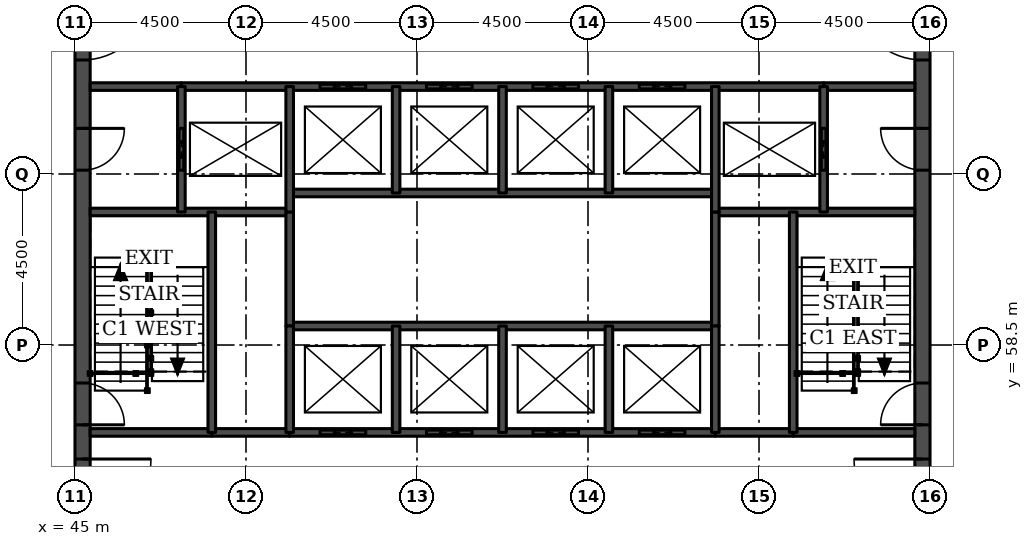
"""IFC4 building model, lengths in metres.
Left out: names, types, materials, properties, quantities, classifications, styles, units other than length and angle.
Written with IfcOpenShell. Run it as: python <this file> out.ifc"""

import sys

from ifc_helpers import new_model, si_unit, direction, frame, frame_2d, origin, place, context, subcontext, project, spatial, rectangle, extrude, element, fill, save


model = new_model("IFC4")
c1 = context("Model", 3, precision=1e-05, world=origin(), true_north=direction((0.0, 1.0)))
c2 = subcontext(c1, "Body", "Model", "MODEL_VIEW")
j1 = project(units=[si_unit("LENGTHUNIT", "METRE"), si_unit("PLANEANGLEUNIT", "RADIAN")], contexts=[c1])
p1 = place(None, origin())
s1 = spatial("IfcSite", under=j1, at=p1, CompositionType="ELEMENT")
p2 = place(p1, origin())
s2 = spatial("IfcBuilding", under=s1, at=p2, CompositionType="ELEMENT")
p3 = place(p2, frame((0.0, 0.0, 155.1)))
s3 = spatial("IfcBuildingStorey", under=s2, at=p3, CompositionType="ELEMENT", Elevation=155.1)
p4 = place(p3, frame((45.2, 49.5, 0.0), z_axis=(0.0, 0.0, 1.0), x_axis=(0.0, 1.0, 0.0)))
e1 = element("IfcWall", 1, at=p4, inside=s3, PredefinedType="SHEAR", context=c2, shape_type="SweptSolid", body=[
    extrude(rectangle(XDim=22.5, YDim=0.4, at=frame_2d((11.25, 0.0))), origin(), (0.0, 0.0, 1.0), 3.7),
])
p5 = place(p4, frame((4.2, 0.0, 0.0)))
e2 = element("IfcOpeningElement", 2, at=p5, cuts=e1, PredefinedType="OPENING", context=c2, shape_type="SweptSolid", body=[
    extrude(rectangle(XDim=1.8, YDim=2.1, at=frame_2d((0.9, 1.05))), frame((0.0, 0.21, 0.0), z_axis=(0.0, -1.0, 0.0), x_axis=(1.0, 0.0, 0.0)), (0.0, 0.0, 1.0), 0.42),
])
p6 = place(p4, frame((6.9, 0.0, 0.0)))
e3 = element("IfcOpeningElement", 3, at=p6, cuts=e1, PredefinedType="OPENING", context=c2, shape_type="SweptSolid", body=[
    extrude(rectangle(XDim=1.1, YDim=2.1, at=frame_2d((0.55, 1.05))), frame((0.0, 0.21, 0.0), z_axis=(0.0, -1.0, 0.0), x_axis=(1.0, 0.0, 0.0)), (0.0, 0.0, 1.0), 0.42),
])
p7 = place(p4, frame((13.6, 0.0, 0.0)))
e4 = element("IfcOpeningElement", 4, at=p7, cuts=e1, PredefinedType="OPENING", context=c2, shape_type="SweptSolid", body=[
    extrude(rectangle(XDim=1.1, YDim=2.1, at=frame_2d((0.55, 1.05))), frame((0.0, 0.21, 0.0), z_axis=(0.0, -1.0, 0.0), x_axis=(1.0, 0.0, 0.0)), (0.0, 0.0, 1.0), 0.42),
])
p8 = place(p4, frame((16.5, 0.0, 0.0)))
e5 = element("IfcOpeningElement", 5, at=p8, cuts=e1, PredefinedType="OPENING", context=c2, shape_type="SweptSolid", body=[
    extrude(rectangle(XDim=1.8, YDim=2.1, at=frame_2d((0.9, 1.05))), frame((0.0, 0.21, 0.0), z_axis=(0.0, -1.0, 0.0), x_axis=(1.0, 0.0, 0.0)), (0.0, 0.0, 1.0), 0.42),
])
p9 = place(p3, frame((67.3, 49.5, 0.0), z_axis=(0.0, 0.0, 1.0), x_axis=(0.0, 1.0, 0.0)))
e6 = element("IfcWall", 6, at=p9, inside=s3, PredefinedType="SHEAR", context=c2, shape_type="SweptSolid", body=[
    extrude(rectangle(XDim=22.5, YDim=0.4, at=frame_2d((11.25, 0.0))), origin(), (0.0, 0.0, 1.0), 3.7),
])
p10 = place(p9, frame((4.2, 0.0, 0.0)))
e7 = element("IfcOpeningElement", 7, at=p10, cuts=e6, PredefinedType="OPENING", context=c2, shape_type="SweptSolid", body=[
    extrude(rectangle(XDim=1.8, YDim=2.1, at=frame_2d((0.9, 1.05))), frame((0.0, 0.21, 0.0), z_axis=(0.0, -1.0, 0.0), x_axis=(1.0, 0.0, 0.0)), (0.0, 0.0, 1.0), 0.42),
])
p11 = place(p9, frame((6.9, 0.0, 0.0)))
e8 = element("IfcOpeningElement", 8, at=p11, cuts=e6, PredefinedType="OPENING", context=c2, shape_type="SweptSolid", body=[
    extrude(rectangle(XDim=1.1, YDim=2.1, at=frame_2d((0.55, 1.05))), frame((0.0, 0.21, 0.0), z_axis=(0.0, -1.0, 0.0), x_axis=(1.0, 0.0, 0.0)), (0.0, 0.0, 1.0), 0.42),
])
p12 = place(p9, frame((13.6, 0.0, 0.0)))
e9 = element("IfcOpeningElement", 9, at=p12, cuts=e6, PredefinedType="OPENING", context=c2, shape_type="SweptSolid", body=[
    extrude(rectangle(XDim=1.1, YDim=2.1, at=frame_2d((0.55, 1.05))), frame((0.0, 0.21, 0.0), z_axis=(0.0, -1.0, 0.0), x_axis=(1.0, 0.0, 0.0)), (0.0, 0.0, 1.0), 0.42),
])
p13 = place(p9, frame((16.5, 0.0, 0.0)))
e10 = element("IfcOpeningElement", 10, at=p13, cuts=e6, PredefinedType="OPENING", context=c2, shape_type="SweptSolid", body=[
    extrude(rectangle(XDim=1.8, YDim=2.1, at=frame_2d((0.9, 1.05))), frame((0.0, 0.21, 0.0), z_axis=(0.0, -1.0, 0.0), x_axis=(1.0, 0.0, 0.0)), (0.0, 0.0, 1.0), 0.42),
])
for number, where, z_axis, x_axis in (
    (11, (48.6, 56.2, 0.0), (0.0, 0.0, 1.0), (1.0, 0.0, 0.0)),
    (12, (61.85, 56.2, 0.0), (0.0, 0.0, 1.0), (1.0, 0.0, 0.0)),
):
    element("IfcWall", number, at=place(p3, frame(where, z_axis=z_axis, x_axis=x_axis)), inside=s3, PredefinedType="SOLIDWALL", context=c2, shape_type="SweptSolid", body=[
        extrude(rectangle(XDim=2.05, YDim=0.2, at=frame_2d((1.025, 0.0))), origin(), (0.0, 0.0, 1.0), 3.55),
    ])
p14 = place(p3, frame((45.4, 56.2, 0.0), z_axis=(0.0, 0.0, 1.0), x_axis=(1.0, 0.0, 0.0)))
e13 = element("IfcWall", 13, at=p14, inside=s3, PredefinedType="SOLIDWALL", context=c2, shape_type="SweptSolid", body=[
    extrude(rectangle(XDim=3.2, YDim=0.2, at=frame_2d((1.6, 0.0))), origin(), (0.0, 0.0, 1.0), 3.55),
])
p15 = place(p3, frame((50.65, 56.2, 0.0), z_axis=(0.0, 0.0, 1.0), x_axis=(1.0, 0.0, 0.0)))
e14 = element("IfcWall", 14, at=p15, inside=s3, PredefinedType="SOLIDWALL", context=c2, shape_type="SweptSolid", body=[
    extrude(rectangle(XDim=11.2, YDim=0.2, at=frame_2d((5.6, 0.0))), origin(), (0.0, 0.0, 1.0), 3.55),
])
p16 = place(p15, frame((0.8, 0.0, 0.0)))
e15 = element("IfcOpeningElement", 15, at=p16, cuts=e14, PredefinedType="OPENING", context=c2, shape_type="SweptSolid", body=[
    extrude(rectangle(XDim=1.2, YDim=2.1, at=frame_2d((0.6, 1.05))), frame((0.0, 0.11, 0.0), z_axis=(0.0, -1.0, 0.0), x_axis=(1.0, 0.0, 0.0)), (0.0, 0.0, 1.0), 0.22),
])
p17 = place(p15, frame((3.6, 0.0, 0.0)))
e16 = element("IfcOpeningElement", 16, at=p17, cuts=e14, PredefinedType="OPENING", context=c2, shape_type="SweptSolid", body=[
    extrude(rectangle(XDim=1.2, YDim=2.1, at=frame_2d((0.6, 1.05))), frame((0.0, 0.11, 0.0), z_axis=(0.0, -1.0, 0.0), x_axis=(1.0, 0.0, 0.0)), (0.0, 0.0, 1.0), 0.22),
])
p18 = place(p15, frame((6.4, 0.0, 0.0)))
e17 = element("IfcOpeningElement", 17, at=p18, cuts=e14, PredefinedType="OPENING", context=c2, shape_type="SweptSolid", body=[
    extrude(rectangle(XDim=1.2, YDim=2.1, at=frame_2d((0.6, 1.05))), frame((0.0, 0.11, 0.0), z_axis=(0.0, -1.0, 0.0), x_axis=(1.0, 0.0, 0.0)), (0.0, 0.0, 1.0), 0.22),
])
p19 = place(p15, frame((9.2, 0.0, 0.0)))
e18 = element("IfcOpeningElement", 18, at=p19, cuts=e14, PredefinedType="OPENING", context=c2, shape_type="SweptSolid", body=[
    extrude(rectangle(XDim=1.2, YDim=2.1, at=frame_2d((0.6, 1.05))), frame((0.0, 0.11, 0.0), z_axis=(0.0, -1.0, 0.0), x_axis=(1.0, 0.0, 0.0)), (0.0, 0.0, 1.0), 0.22),
])
p20 = place(p3, frame((63.9, 56.2, 0.0), z_axis=(0.0, 0.0, 1.0), x_axis=(1.0, 0.0, 0.0)))
e19 = element("IfcWall", 19, at=p20, inside=s3, PredefinedType="SOLIDWALL", context=c2, shape_type="SweptSolid", body=[
    extrude(rectangle(XDim=3.2, YDim=0.2, at=frame_2d((1.6, 0.0))), origin(), (0.0, 0.0, 1.0), 3.55),
])
p21 = place(p3, frame((50.65, 59.0, 0.0), z_axis=(0.0, 0.0, 1.0), x_axis=(1.0, 0.0, 0.0)))
e20 = element("IfcWall", 20, at=p21, inside=s3, PredefinedType="SOLIDWALL", context=c2, shape_type="SweptSolid", body=[
    extrude(rectangle(XDim=11.2, YDim=0.2, at=frame_2d((5.6, 0.0))), origin(), (0.0, 0.0, 1.0), 3.7),
])
for number, where, z_axis, x_axis in (
    (21, (45.4, 62.0, 0.0), (0.0, 0.0, 1.0), (1.0, 0.0, 0.0)),
    (22, (61.85, 62.0, 0.0), (0.0, 0.0, 1.0), (1.0, 0.0, 0.0)),
):
    element("IfcWall", number, at=place(p3, frame(where, z_axis=z_axis, x_axis=x_axis)), inside=s3, PredefinedType="SOLIDWALL", context=c2, shape_type="SweptSolid", body=[
        extrude(rectangle(XDim=5.25, YDim=0.2, at=frame_2d((2.625, 0.0))), origin(), (0.0, 0.0, 1.0), 3.55),
    ])
p22 = place(p3, frame((50.65, 62.5, 0.0), z_axis=(0.0, 0.0, 1.0), x_axis=(1.0, 0.0, 0.0)))
e23 = element("IfcWall", 23, at=p22, inside=s3, PredefinedType="SOLIDWALL", context=c2, shape_type="SweptSolid", body=[
    extrude(rectangle(XDim=11.2, YDim=0.2, at=frame_2d((5.6, 0.0))), origin(), (0.0, 0.0, 1.0), 3.7),
])
for number, where, z_axis, x_axis in (
    (24, (45.4, 65.3, 0.0), (0.0, 0.0, 1.0), (1.0, 0.0, 0.0)),
    (25, (64.7, 65.3, 0.0), (0.0, 0.0, 1.0), (1.0, 0.0, 0.0)),
):
    element("IfcWall", number, at=place(p3, frame(where, z_axis=z_axis, x_axis=x_axis)), inside=s3, PredefinedType="SOLIDWALL", context=c2, shape_type="SweptSolid", body=[
        extrude(rectangle(XDim=2.4, YDim=0.2, at=frame_2d((1.2, 0.0))), origin(), (0.0, 0.0, 1.0), 3.55),
    ])
p23 = place(p3, frame((47.8, 65.3, 0.0), z_axis=(0.0, 0.0, 1.0), x_axis=(1.0, 0.0, 0.0)))
e26 = element("IfcWall", 26, at=p23, inside=s3, PredefinedType="SOLIDWALL", context=c2, shape_type="SweptSolid", body=[
    extrude(rectangle(XDim=16.9, YDim=0.2, at=frame_2d((8.45, 0.0))), origin(), (0.0, 0.0, 1.0), 3.55),
])
p24 = place(p23, frame((3.65, 0.0, 0.0)))
e27 = element("IfcOpeningElement", 27, at=p24, cuts=e26, PredefinedType="OPENING", context=c2, shape_type="SweptSolid", body=[
    extrude(rectangle(XDim=1.2, YDim=2.1, at=frame_2d((0.6, 1.05))), frame((0.0, 0.11, 0.0), z_axis=(0.0, -1.0, 0.0), x_axis=(1.0, 0.0, 0.0)), (0.0, 0.0, 1.0), 0.22),
])
p25 = place(p23, frame((6.45, 0.0, 0.0)))
e28 = element("IfcOpeningElement", 28, at=p25, cuts=e26, PredefinedType="OPENING", context=c2, shape_type="SweptSolid", body=[
    extrude(rectangle(XDim=1.2, YDim=2.1, at=frame_2d((0.6, 1.05))), frame((0.0, 0.11, 0.0), z_axis=(0.0, -1.0, 0.0), x_axis=(1.0, 0.0, 0.0)), (0.0, 0.0, 1.0), 0.22),
])
p26 = place(p23, frame((9.25, 0.0, 0.0)))
e29 = element("IfcOpeningElement", 29, at=p26, cuts=e26, PredefinedType="OPENING", context=c2, shape_type="SweptSolid", body=[
    extrude(rectangle(XDim=1.2, YDim=2.1, at=frame_2d((0.6, 1.05))), frame((0.0, 0.11, 0.0), z_axis=(0.0, -1.0, 0.0), x_axis=(1.0, 0.0, 0.0)), (0.0, 0.0, 1.0), 0.22),
])
p27 = place(p23, frame((12.05, 0.0, 0.0)))
e30 = element("IfcOpeningElement", 30, at=p27, cuts=e26, PredefinedType="OPENING", context=c2, shape_type="SweptSolid", body=[
    extrude(rectangle(XDim=1.2, YDim=2.1, at=frame_2d((0.6, 1.05))), frame((0.0, 0.11, 0.0), z_axis=(0.0, -1.0, 0.0), x_axis=(1.0, 0.0, 0.0)), (0.0, 0.0, 1.0), 0.22),
])
p28 = place(p3, frame((47.8, 62.0, 0.0), z_axis=(0.0, 0.0, 1.0), x_axis=(0.0, 1.0, 0.0)))
e31 = element("IfcWall", 31, at=p28, inside=s3, PredefinedType="SOLIDWALL", context=c2, shape_type="SweptSolid", body=[
    extrude(rectangle(XDim=3.3, YDim=0.2, at=frame_2d((1.65, 0.0))), origin(), (0.0, 0.0, 1.0), 3.55),
])
p29 = place(p28, frame((1.1, 0.0, 0.0)))
e32 = element("IfcOpeningElement", 32, at=p29, cuts=e31, PredefinedType="OPENING", context=c2, shape_type="SweptSolid", body=[
    extrude(rectangle(XDim=1.1, YDim=2.1, at=frame_2d((0.55, 1.05))), frame((0.0, 0.11, 0.0), z_axis=(0.0, -1.0, 0.0), x_axis=(1.0, 0.0, 0.0)), (0.0, 0.0, 1.0), 0.22),
])
p30 = place(p3, frame((48.6, 56.2, 0.0), z_axis=(0.0, 0.0, 1.0), x_axis=(0.0, 1.0, 0.0)))
e33 = element("IfcWall", 33, at=p30, inside=s3, PredefinedType="SOLIDWALL", context=c2, shape_type="SweptSolid", body=[
    extrude(rectangle(XDim=5.8, YDim=0.2, at=frame_2d((2.9, 0.0))), origin(), (0.0, 0.0, 1.0), 3.55),
])
p31 = place(p3, frame((50.65, 59.0, 0.0), z_axis=(0.0, 0.0, 1.0), x_axis=(0.0, 1.0, 0.0)))
e34 = element("IfcWall", 34, at=p31, inside=s3, PredefinedType="SOLIDWALL", context=c2, shape_type="SweptSolid", body=[
    extrude(rectangle(XDim=3.0, YDim=0.2, at=frame_2d((1.5, 0.0))), origin(), (0.0, 0.0, 1.0), 3.7),
])
p32 = place(p3, frame((50.65, 56.2, 0.0), z_axis=(0.0, 0.0, 1.0), x_axis=(0.0, 1.0, 0.0)))
e35 = element("IfcWall", 35, at=p32, inside=s3, PredefinedType="SOLIDWALL", context=c2, shape_type="SweptSolid", body=[
    extrude(rectangle(XDim=2.8, YDim=0.2, at=frame_2d((1.4, 0.0))), origin(), (0.0, 0.0, 1.0), 3.55),
])
p33 = place(p3, frame((50.65, 62.0, 0.0), z_axis=(0.0, 0.0, 1.0), x_axis=(0.0, 1.0, 0.0)))
e36 = element("IfcWall", 36, at=p33, inside=s3, PredefinedType="SOLIDWALL", context=c2, shape_type="SweptSolid", body=[
    extrude(rectangle(XDim=3.3, YDim=0.2, at=frame_2d((1.65, 0.0))), origin(), (0.0, 0.0, 1.0), 3.55),
])
for number, where, z_axis, x_axis in (
    (37, (53.45, 56.2, 0.0), (0.0, 0.0, 1.0), (0.0, 1.0, 0.0)),
    (38, (53.45, 62.5, 0.0), (0.0, 0.0, 1.0), (0.0, 1.0, 0.0)),
    (39, (56.25, 56.2, 0.0), (0.0, 0.0, 1.0), (0.0, 1.0, 0.0)),
    (40, (56.25, 62.5, 0.0), (0.0, 0.0, 1.0), (0.0, 1.0, 0.0)),
    (41, (59.05, 56.2, 0.0), (0.0, 0.0, 1.0), (0.0, 1.0, 0.0)),
    (42, (59.05, 62.5, 0.0), (0.0, 0.0, 1.0), (0.0, 1.0, 0.0)),
):
    element("IfcWall", number, at=place(p3, frame(where, z_axis=z_axis, x_axis=x_axis)), inside=s3, PredefinedType="SOLIDWALL", context=c2, shape_type="SweptSolid", body=[
        extrude(rectangle(XDim=2.8, YDim=0.2, at=frame_2d((1.4, 0.0))), origin(), (0.0, 0.0, 1.0), 3.55),
    ])
p34 = place(p3, frame((61.85, 59.0, 0.0), z_axis=(0.0, 0.0, 1.0), x_axis=(0.0, 1.0, 0.0)))
e43 = element("IfcWall", 43, at=p34, inside=s3, PredefinedType="SOLIDWALL", context=c2, shape_type="SweptSolid", body=[
    extrude(rectangle(XDim=3.0, YDim=0.2, at=frame_2d((1.5, 0.0))), origin(), (0.0, 0.0, 1.0), 3.7),
])
p35 = place(p3, frame((61.85, 56.2, 0.0), z_axis=(0.0, 0.0, 1.0), x_axis=(0.0, 1.0, 0.0)))
e44 = element("IfcWall", 44, at=p35, inside=s3, PredefinedType="SOLIDWALL", context=c2, shape_type="SweptSolid", body=[
    extrude(rectangle(XDim=2.8, YDim=0.2, at=frame_2d((1.4, 0.0))), origin(), (0.0, 0.0, 1.0), 3.55),
])
p36 = place(p3, frame((61.85, 62.0, 0.0), z_axis=(0.0, 0.0, 1.0), x_axis=(0.0, 1.0, 0.0)))
e45 = element("IfcWall", 45, at=p36, inside=s3, PredefinedType="SOLIDWALL", context=c2, shape_type="SweptSolid", body=[
    extrude(rectangle(XDim=3.3, YDim=0.2, at=frame_2d((1.65, 0.0))), origin(), (0.0, 0.0, 1.0), 3.55),
])
p37 = place(p3, frame((63.9, 56.2, 0.0), z_axis=(0.0, 0.0, 1.0), x_axis=(0.0, 1.0, 0.0)))
e46 = element("IfcWall", 46, at=p37, inside=s3, PredefinedType="SOLIDWALL", context=c2, shape_type="SweptSolid", body=[
    extrude(rectangle(XDim=5.8, YDim=0.2, at=frame_2d((2.9, 0.0))), origin(), (0.0, 0.0, 1.0), 3.55),
])
p38 = place(p3, frame((64.7, 62.0, 0.0), z_axis=(0.0, 0.0, 1.0), x_axis=(0.0, 1.0, 0.0)))
e47 = element("IfcWall", 47, at=p38, inside=s3, PredefinedType="SOLIDWALL", context=c2, shape_type="SweptSolid", body=[
    extrude(rectangle(XDim=3.3, YDim=0.2, at=frame_2d((1.65, 0.0))), origin(), (0.0, 0.0, 1.0), 3.55),
])
p39 = place(p38, frame((1.1, 0.0, 0.0)))
e48 = element("IfcOpeningElement", 48, at=p39, cuts=e47, PredefinedType="OPENING", context=c2, shape_type="SweptSolid", body=[
    extrude(rectangle(XDim=1.1, YDim=2.1, at=frame_2d((0.55, 1.05))), frame((0.0, 0.11, 0.0), z_axis=(0.0, -1.0, 0.0), x_axis=(1.0, 0.0, 0.0)), (0.0, 0.0, 1.0), 0.22),
])
p40 = place(p16, origin())
e49 = element("IfcDoor", 49, at=p40, inside=s3, OperationType="DOUBLE_DOOR_SLIDING", PredefinedType="DOOR", context=c2, shape_type="SweptSolid", body=[
    extrude(rectangle(XDim=1.2, YDim=2.1, at=frame_2d((0.6, 1.05))), frame((0.0, 0.025, 0.0), z_axis=(0.0, -1.0, 0.0), x_axis=(1.0, 0.0, 0.0)), (0.0, 0.0, 1.0), 0.05),
])
fill(e15, e49)
p41 = place(p17, origin())
e50 = element("IfcDoor", 50, at=p41, inside=s3, OperationType="DOUBLE_DOOR_SLIDING", PredefinedType="DOOR", context=c2, shape_type="SweptSolid", body=[
    extrude(rectangle(XDim=1.2, YDim=2.1, at=frame_2d((0.6, 1.05))), frame((0.0, 0.025, 0.0), z_axis=(0.0, -1.0, 0.0), x_axis=(1.0, 0.0, 0.0)), (0.0, 0.0, 1.0), 0.05),
])
fill(e16, e50)
p42 = place(p18, origin())
e51 = element("IfcDoor", 51, at=p42, inside=s3, OperationType="DOUBLE_DOOR_SLIDING", PredefinedType="DOOR", context=c2, shape_type="SweptSolid", body=[
    extrude(rectangle(XDim=1.2, YDim=2.1, at=frame_2d((0.6, 1.05))), frame((0.0, 0.025, 0.0), z_axis=(0.0, -1.0, 0.0), x_axis=(1.0, 0.0, 0.0)), (0.0, 0.0, 1.0), 0.05),
])
fill(e17, e51)
p43 = place(p19, origin())
e52 = element("IfcDoor", 52, at=p43, inside=s3, OperationType="DOUBLE_DOOR_SLIDING", PredefinedType="DOOR", context=c2, shape_type="SweptSolid", body=[
    extrude(rectangle(XDim=1.2, YDim=2.1, at=frame_2d((0.6, 1.05))), frame((0.0, 0.025, 0.0), z_axis=(0.0, -1.0, 0.0), x_axis=(1.0, 0.0, 0.0)), (0.0, 0.0, 1.0), 0.05),
])
fill(e18, e52)
p44 = place(p24, origin())
e53 = element("IfcDoor", 53, at=p44, inside=s3, OperationType="DOUBLE_DOOR_SLIDING", PredefinedType="DOOR", context=c2, shape_type="SweptSolid", body=[
    extrude(rectangle(XDim=1.2, YDim=2.1, at=frame_2d((0.6, 1.05))), frame((0.0, 0.025, 0.0), z_axis=(0.0, -1.0, 0.0), x_axis=(1.0, 0.0, 0.0)), (0.0, 0.0, 1.0), 0.05),
])
fill(e27, e53)
p45 = place(p25, origin())
e54 = element("IfcDoor", 54, at=p45, inside=s3, OperationType="DOUBLE_DOOR_SLIDING", PredefinedType="DOOR", context=c2, shape_type="SweptSolid", body=[
    extrude(rectangle(XDim=1.2, YDim=2.1, at=frame_2d((0.6, 1.05))), frame((0.0, 0.025, 0.0), z_axis=(0.0, -1.0, 0.0), x_axis=(1.0, 0.0, 0.0)), (0.0, 0.0, 1.0), 0.05),
])
fill(e28, e54)
p46 = place(p26, origin())
e55 = element("IfcDoor", 55, at=p46, inside=s3, OperationType="DOUBLE_DOOR_SLIDING", PredefinedType="DOOR", context=c2, shape_type="SweptSolid", body=[
    extrude(rectangle(XDim=1.2, YDim=2.1, at=frame_2d((0.6, 1.05))), frame((0.0, 0.025, 0.0), z_axis=(0.0, -1.0, 0.0), x_axis=(1.0, 0.0, 0.0)), (0.0, 0.0, 1.0), 0.05),
])
fill(e29, e55)
p47 = place(p27, origin())
e56 = element("IfcDoor", 56, at=p47, inside=s3, OperationType="DOUBLE_DOOR_SLIDING", PredefinedType="DOOR", context=c2, shape_type="SweptSolid", body=[
    extrude(rectangle(XDim=1.2, YDim=2.1, at=frame_2d((0.6, 1.05))), frame((0.0, 0.025, 0.0), z_axis=(0.0, -1.0, 0.0), x_axis=(1.0, 0.0, 0.0)), (0.0, 0.0, 1.0), 0.05),
])
fill(e30, e56)
p48 = place(p29, origin())
e57 = element("IfcDoor", 57, at=p48, inside=s3, OperationType="DOUBLE_DOOR_SLIDING", PredefinedType="DOOR", context=c2, shape_type="SweptSolid", body=[
    extrude(rectangle(XDim=1.1, YDim=2.1, at=frame_2d((0.55, 1.05))), frame((0.0, 0.025, 0.0), z_axis=(0.0, -1.0, 0.0), x_axis=(1.0, 0.0, 0.0)), (0.0, 0.0, 1.0), 0.05),
])
fill(e32, e57)
p49 = place(p39, origin())
e58 = element("IfcDoor", 58, at=p49, inside=s3, OperationType="DOUBLE_DOOR_SLIDING", PredefinedType="DOOR", context=c2, shape_type="SweptSolid", body=[
    extrude(rectangle(XDim=1.1, YDim=2.1, at=frame_2d((0.55, 1.05))), frame((0.0, 0.025, 0.0), z_axis=(0.0, -1.0, 0.0), x_axis=(1.0, 0.0, 0.0)), (0.0, 0.0, 1.0), 0.05),
])
fill(e48, e58)
p50 = place(p5, frame((1.8, 0.0, 0.0), z_axis=(0.0, 0.0, 1.0), x_axis=(-1.0, 0.0, 0.0)))
e59 = element("IfcDoor", 59, at=p50, inside=s3, OperationType="SINGLE_SWING_LEFT", PredefinedType="DOOR", context=c2, shape_type="SweptSolid", body=[
    extrude(rectangle(XDim=1.8, YDim=2.1, at=frame_2d((0.9, 1.05))), frame((0.0, 0.025, 0.0), z_axis=(0.0, -1.0, 0.0), x_axis=(1.0, 0.0, 0.0)), (0.0, 0.0, 1.0), 0.05),
])
fill(e2, e59)
p51 = place(p6, frame((1.1, 0.0, 0.0), z_axis=(0.0, 0.0, 1.0), x_axis=(-1.0, 0.0, 0.0)))
e60 = element("IfcDoor", 60, at=p51, inside=s3, OperationType="SINGLE_SWING_RIGHT", PredefinedType="DOOR", context=c2, shape_type="SweptSolid", body=[
    extrude(rectangle(XDim=1.1, YDim=2.1, at=frame_2d((0.55, 1.05))), frame((0.0, 0.025, 0.0), z_axis=(0.0, -1.0, 0.0), x_axis=(1.0, 0.0, 0.0)), (0.0, 0.0, 1.0), 0.05),
])
fill(e3, e60)
p52 = place(p7, frame((1.1, 0.0, 0.0), z_axis=(0.0, 0.0, 1.0), x_axis=(-1.0, 0.0, 0.0)))
e61 = element("IfcDoor", 61, at=p52, inside=s3, OperationType="SINGLE_SWING_LEFT", PredefinedType="DOOR", context=c2, shape_type="SweptSolid", body=[
    extrude(rectangle(XDim=1.1, YDim=2.1, at=frame_2d((0.55, 1.05))), frame((0.0, 0.025, 0.0), z_axis=(0.0, -1.0, 0.0), x_axis=(1.0, 0.0, 0.0)), (0.0, 0.0, 1.0), 0.05),
])
fill(e4, e61)
p53 = place(p8, frame((1.8, 0.0, 0.0), z_axis=(0.0, 0.0, 1.0), x_axis=(-1.0, 0.0, 0.0)))
e62 = element("IfcDoor", 62, at=p53, inside=s3, OperationType="SINGLE_SWING_LEFT", PredefinedType="DOOR", context=c2, shape_type="SweptSolid", body=[
    extrude(rectangle(XDim=1.8, YDim=2.1, at=frame_2d((0.9, 1.05))), frame((0.0, 0.025, 0.0), z_axis=(0.0, -1.0, 0.0), x_axis=(1.0, 0.0, 0.0)), (0.0, 0.0, 1.0), 0.05),
])
fill(e5, e62)
p54 = place(p10, origin())
e63 = element("IfcDoor", 63, at=p54, inside=s3, OperationType="SINGLE_SWING_RIGHT", PredefinedType="DOOR", context=c2, shape_type="SweptSolid", body=[
    extrude(rectangle(XDim=1.8, YDim=2.1, at=frame_2d((0.9, 1.05))), frame((0.0, 0.025, 0.0), z_axis=(0.0, -1.0, 0.0), x_axis=(1.0, 0.0, 0.0)), (0.0, 0.0, 1.0), 0.05),
])
fill(e7, e63)
p55 = place(p11, origin())
e64 = element("IfcDoor", 64, at=p55, inside=s3, OperationType="SINGLE_SWING_LEFT", PredefinedType="DOOR", context=c2, shape_type="SweptSolid", body=[
    extrude(rectangle(XDim=1.1, YDim=2.1, at=frame_2d((0.55, 1.05))), frame((0.0, 0.025, 0.0), z_axis=(0.0, -1.0, 0.0), x_axis=(1.0, 0.0, 0.0)), (0.0, 0.0, 1.0), 0.05),
])
fill(e8, e64)
p56 = place(p12, origin())
e65 = element("IfcDoor", 65, at=p56, inside=s3, OperationType="SINGLE_SWING_RIGHT", PredefinedType="DOOR", context=c2, shape_type="SweptSolid", body=[
    extrude(rectangle(XDim=1.1, YDim=2.1, at=frame_2d((0.55, 1.05))), frame((0.0, 0.025, 0.0), z_axis=(0.0, -1.0, 0.0), x_axis=(1.0, 0.0, 0.0)), (0.0, 0.0, 1.0), 0.05),
])
fill(e9, e65)
p57 = place(p13, origin())
e66 = element("IfcDoor", 66, at=p57, inside=s3, OperationType="SINGLE_SWING_RIGHT", PredefinedType="DOOR", context=c2, shape_type="SweptSolid", body=[
    extrude(rectangle(XDim=1.8, YDim=2.1, at=frame_2d((0.9, 1.05))), frame((0.0, 0.025, 0.0), z_axis=(0.0, -1.0, 0.0), x_axis=(1.0, 0.0, 0.0)), (0.0, 0.0, 1.0), 0.05),
])
fill(e10, e66)
save(model, sys.argv[1])
